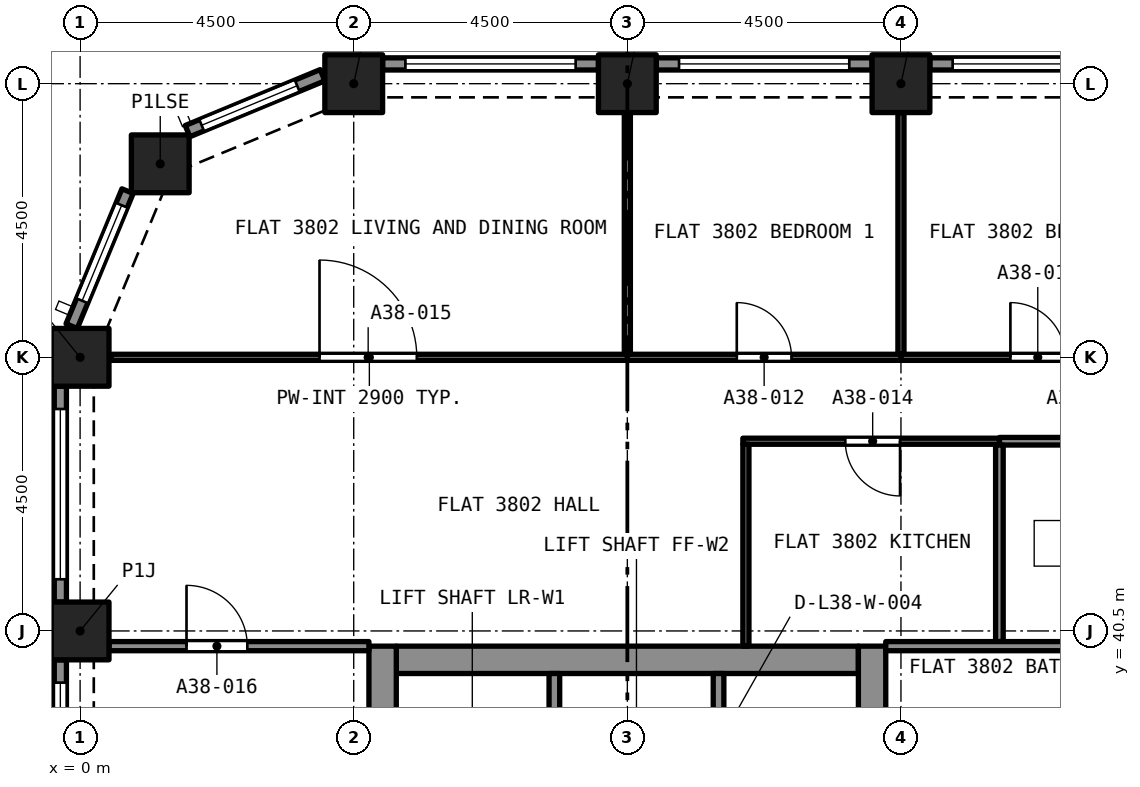
"""IFC4 building model, lengths in metres.
Left out: names, types, materials, properties, quantities, classifications, styles, units other than length and angle.
Written with IfcOpenShell. Run it as: python <this file> out.ifc"""

import sys

from ifc_helpers import new_model, si_unit, direction, frame, frame_2d, origin, origin_2d, place, context, subcontext, project, spatial, rectangle, extrude, element, fill, save


model = new_model("IFC4")
c1 = context("Model", 3, precision=1e-05, world=origin(), true_north=direction((0.0, 1.0)))
c2 = subcontext(c1, "Body", "Model", "MODEL_VIEW")
j1 = project(units=[si_unit("LENGTHUNIT", "METRE"), si_unit("PLANEANGLEUNIT", "RADIAN")], contexts=[c1])
p1 = place(None, origin())
s1 = spatial("IfcSite", under=j1, at=p1, CompositionType="ELEMENT")
p2 = place(p1, origin())
s2 = spatial("IfcBuilding", under=s1, at=p2, CompositionType="ELEMENT")
p3 = place(p2, frame((0.0, 0.0, 136.6)))
s3 = spatial("IfcBuildingStorey", under=s2, at=p3, CompositionType="ELEMENT", Elevation=136.6)
for number, where, z_axis, x_axis in (
    (1, (0.0, 40.5, 0.0), (0.0, 0.0, 1.0), (1.0, 0.0, 0.0)),
    (2, (0.0, 45.0, 0.0), (0.0, 0.0, 1.0), (1.0, 0.0, 0.0)),
    (3, (1.318, 48.182, 0.0), (0.0, 0.0, 1.0), (1.0, 0.0, 0.0)),
    (4, (4.5, 49.5, 0.0), (0.0, 0.0, 1.0), (1.0, 0.0, 0.0)),
    (5, (9.0, 49.5, 0.0), (0.0, 0.0, 1.0), (1.0, 0.0, 0.0)),
    (6, (13.5, 49.5, 0.0), (0.0, 0.0, 1.0), (1.0, 0.0, 0.0)),
):
    element("IfcColumn", number, at=place(p3, frame(where, z_axis=z_axis, x_axis=x_axis)), inside=s3, PredefinedType="COLUMN", context=c2, shape_type="SweptSolid", body=[
        extrude(rectangle(XDim=0.95, YDim=0.95, at=origin_2d()), origin(), (0.0, 0.0, 1.0), 3.2),
    ])
p4 = place(p3, frame((5.2, 40.025, 0.0), z_axis=(0.0, 0.0, 1.0), x_axis=(1.0, 0.0, 0.0)))
e7 = element("IfcWall", 7, at=p4, inside=s3, PredefinedType="SOLIDWALL", context=c2, shape_type="SweptSolid", body=[
    extrude(rectangle(XDim=7.6, YDim=0.45, at=frame_2d((3.8, 0.0))), origin(), (0.0, 0.0, 1.0), 3.2),
])
p5 = place(p3, frame((4.975, 27.25, 0.0), z_axis=(0.0, 0.0, 1.0), x_axis=(0.0, 1.0, 0.0)))
e8 = element("IfcWall", 8, at=p5, inside=s3, PredefinedType="SOLIDWALL", context=c2, shape_type="SweptSolid", body=[
    extrude(rectangle(XDim=13.0, YDim=0.45, at=frame_2d((6.5, 0.0))), origin(), (0.0, 0.0, 1.0), 3.2),
])
p6 = place(p5, frame((8.7, 0.0, 0.0)))
e9 = element("IfcOpeningElement", 9, at=p6, cuts=e8, PredefinedType="OPENING", context=c2, shape_type="SweptSolid", body=[
    extrude(rectangle(XDim=1.2, YDim=2.1, at=frame_2d((0.6, 1.05))), frame((0.0, 0.235, 0.0), z_axis=(0.0, -1.0, 0.0), x_axis=(1.0, 0.0, 0.0)), (0.0, 0.0, 1.0), 0.47),
])
p7 = place(p3, frame((13.025, 27.25, 0.0), z_axis=(0.0, 0.0, 1.0), x_axis=(0.0, 1.0, 0.0)))
e10 = element("IfcWall", 10, at=p7, inside=s3, PredefinedType="SOLIDWALL", context=c2, shape_type="SweptSolid", body=[
    extrude(rectangle(XDim=13.0, YDim=0.45, at=frame_2d((6.5, 0.0))), origin(), (0.0, 0.0, 1.0), 3.2),
])
p8 = place(p7, frame((10.85, 0.0, 0.0)))
e11 = element("IfcOpeningElement", 11, at=p8, cuts=e10, PredefinedType="OPENING", context=c2, shape_type="SweptSolid", body=[
    extrude(rectangle(XDim=1.1, YDim=2.1, at=frame_2d((0.55, 1.05))), frame((0.0, 0.235, 0.0), z_axis=(0.0, -1.0, 0.0), x_axis=(1.0, 0.0, 0.0)), (0.0, 0.0, 1.0), 0.47),
])
p9 = place(p7, frame((8.7, 0.0, 0.0)))
e12 = element("IfcOpeningElement", 12, at=p9, cuts=e10, PredefinedType="OPENING", context=c2, shape_type="SweptSolid", body=[
    extrude(rectangle(XDim=1.2, YDim=2.1, at=frame_2d((0.6, 1.05))), frame((0.0, 0.235, 0.0), z_axis=(0.0, -1.0, 0.0), x_axis=(1.0, 0.0, 0.0)), (0.0, 0.0, 1.0), 0.47),
])
p10 = place(p3, frame((13.975, 49.825, 0.0), z_axis=(0.0, 0.0, 1.0), x_axis=(1.0, 0.0, 0.0)))
e13 = element("IfcWall", 13, at=p10, inside=s3, PredefinedType="SOLIDWALL", context=c2, shape_type="SweptSolid", body=[
    extrude(rectangle(XDim=3.55, YDim=0.2, at=frame_2d((1.775, 0.0))), origin(), (0.0, 0.0, 1.0), 3.2),
])
p11 = place(p10, frame((0.375, 0.0, 0.45)))
e14 = element("IfcOpeningElement", 14, at=p11, cuts=e13, PredefinedType="OPENING", context=c2, shape_type="SweptSolid", body=[
    extrude(rectangle(XDim=2.8, YDim=1.95, at=frame_2d((1.4, 0.975))), frame((0.0, 0.11, 0.0), z_axis=(0.0, -1.0, 0.0), x_axis=(1.0, 0.0, 0.0)), (0.0, 0.0, 1.0), 0.22),
])
p12 = place(p3, frame((9.475, 49.825, 0.0), z_axis=(0.0, 0.0, 1.0), x_axis=(1.0, 0.0, 0.0)))
e15 = element("IfcWall", 15, at=p12, inside=s3, PredefinedType="SOLIDWALL", context=c2, shape_type="SweptSolid", body=[
    extrude(rectangle(XDim=3.55, YDim=0.2, at=frame_2d((1.775, 0.0))), origin(), (0.0, 0.0, 1.0), 3.2),
])
p13 = place(p12, frame((0.375, 0.0, 0.45)))
e16 = element("IfcOpeningElement", 16, at=p13, cuts=e15, PredefinedType="OPENING", context=c2, shape_type="SweptSolid", body=[
    extrude(rectangle(XDim=2.8, YDim=1.95, at=frame_2d((1.4, 0.975))), frame((0.0, 0.11, 0.0), z_axis=(0.0, -1.0, 0.0), x_axis=(1.0, 0.0, 0.0)), (0.0, 0.0, 1.0), 0.22),
])
p14 = place(p3, frame((4.975, 49.825, 0.0), z_axis=(0.0, 0.0, 1.0), x_axis=(1.0, 0.0, 0.0)))
e17 = element("IfcWall", 17, at=p14, inside=s3, PredefinedType="SOLIDWALL", context=c2, shape_type="SweptSolid", body=[
    extrude(rectangle(XDim=3.55, YDim=0.2, at=frame_2d((1.775, 0.0))), origin(), (0.0, 0.0, 1.0), 3.2),
])
p15 = place(p14, frame((0.375, 0.0, 0.45)))
e18 = element("IfcOpeningElement", 18, at=p15, cuts=e17, PredefinedType="OPENING", context=c2, shape_type="SweptSolid", body=[
    extrude(rectangle(XDim=2.8, YDim=1.95, at=frame_2d((1.4, 0.975))), frame((0.0, 0.11, 0.0), z_axis=(0.0, -1.0, 0.0), x_axis=(1.0, 0.0, 0.0)), (0.0, 0.0, 1.0), 0.22),
])
p16 = place(p3, frame((1.767, 48.72, 0.0), z_axis=(0.0, 0.0, 1.0), x_axis=(0.923880599843, 0.382680855588, 0.0)))
e19 = element("IfcWall", 19, at=p16, inside=s3, PredefinedType="SOLIDWALL", context=c2, shape_type="SweptSolid", body=[
    extrude(rectangle(XDim=2.403, YDim=0.2, at=frame_2d((1.201, 0.0))), origin(), (0.0, 0.0, 1.0), 3.2),
])
p17 = place(p16, frame((0.251, 0.0, 0.45)))
e20 = element("IfcOpeningElement", 20, at=p17, cuts=e19, PredefinedType="OPENING", context=c2, shape_type="SweptSolid", body=[
    extrude(rectangle(XDim=1.7, YDim=1.95, at=frame_2d((0.85, 0.975))), frame((0.0, 0.11, 0.0), z_axis=(0.0, -1.0, 0.0), x_axis=(1.0, 0.0, 0.0)), (0.0, 0.0, 1.0), 0.22),
])
p18 = place(p3, frame((-0.139, 45.513, 0.0), z_axis=(0.0, 0.0, 1.0), x_axis=(0.382680855588, 0.923880599843, 0.0)))
e21 = element("IfcWall", 21, at=p18, inside=s3, PredefinedType="SOLIDWALL", context=c2, shape_type="SweptSolid", body=[
    extrude(rectangle(XDim=2.403, YDim=0.2, at=frame_2d((1.201, 0.0))), origin(), (0.0, 0.0, 1.0), 3.2),
])
p19 = place(p18, frame((0.451, 0.0, 0.45)))
e22 = element("IfcOpeningElement", 22, at=p19, cuts=e21, PredefinedType="OPENING", context=c2, shape_type="SweptSolid", body=[
    extrude(rectangle(XDim=1.7, YDim=1.95, at=frame_2d((0.85, 0.975))), frame((0.0, 0.11, 0.0), z_axis=(0.0, -1.0, 0.0), x_axis=(1.0, 0.0, 0.0)), (0.0, 0.0, 1.0), 0.22),
])
p20 = place(p3, frame((-0.325, 40.975, 0.0), z_axis=(0.0, 0.0, 1.0), x_axis=(0.0, 1.0, 0.0)))
e23 = element("IfcWall", 23, at=p20, inside=s3, PredefinedType="SOLIDWALL", context=c2, shape_type="SweptSolid", body=[
    extrude(rectangle(XDim=3.55, YDim=0.2, at=frame_2d((1.775, 0.0))), origin(), (0.0, 0.0, 1.0), 3.2),
])
p21 = place(p20, frame((0.375, 0.0, 0.45)))
e24 = element("IfcOpeningElement", 24, at=p21, cuts=e23, PredefinedType="OPENING", context=c2, shape_type="SweptSolid", body=[
    extrude(rectangle(XDim=2.8, YDim=1.95, at=frame_2d((1.4, 0.975))), frame((0.0, 0.11, 0.0), z_axis=(0.0, -1.0, 0.0), x_axis=(1.0, 0.0, 0.0)), (0.0, 0.0, 1.0), 0.22),
])
p22 = place(p3, frame((-0.325, 36.475, 0.0), z_axis=(0.0, 0.0, 1.0), x_axis=(0.0, 1.0, 0.0)))
e25 = element("IfcWall", 25, at=p22, inside=s3, PredefinedType="SOLIDWALL", context=c2, shape_type="SweptSolid", body=[
    extrude(rectangle(XDim=3.55, YDim=0.2, at=frame_2d((1.775, 0.0))), origin(), (0.0, 0.0, 1.0), 3.2),
])
p23 = place(p22, frame((0.375, 0.0, 0.45)))
e26 = element("IfcOpeningElement", 26, at=p23, cuts=e25, PredefinedType="OPENING", context=c2, shape_type="SweptSolid", body=[
    extrude(rectangle(XDim=2.8, YDim=1.95, at=frame_2d((1.4, 0.975))), frame((0.0, 0.11, 0.0), z_axis=(0.0, -1.0, 0.0), x_axis=(1.0, 0.0, 0.0)), (0.0, 0.0, 1.0), 0.22),
])
p24 = place(p3, frame((17.9, 43.62, 0.0), z_axis=(0.0, 0.0, 1.0), x_axis=(-1.0, 0.0, 0.0)))
e27 = element("IfcWall", 27, at=p24, inside=s3, PredefinedType="PARTITIONING", context=c2, shape_type="SweptSolid", body=[
    extrude(rectangle(XDim=2.781, YDim=0.125, at=frame_2d((1.39, 0.0))), origin(), (0.0, 0.0, 1.0), 2.9),
])
p25 = place(p24, frame((0.94, 0.0, 0.0)))
e28 = element("IfcOpeningElement", 28, at=p25, cuts=e27, PredefinedType="OPENING", context=c2, shape_type="SweptSolid", body=[
    extrude(rectangle(XDim=0.8, YDim=2.1, at=frame_2d((0.4, 1.05))), frame((0.0, 0.073, 0.0), z_axis=(0.0, -1.0, 0.0), x_axis=(1.0, 0.0, 0.0)), (0.0, 0.0, 1.0), 0.145),
])
p26 = place(p3, frame((15.119, 40.325, 0.0), z_axis=(0.0, 0.0, 1.0), x_axis=(0.0, 1.0, 0.0)))
e29 = element("IfcWall", 29, at=p26, inside=s3, PredefinedType="PARTITIONING", context=c2, shape_type="SweptSolid", body=[
    extrude(rectangle(XDim=3.233, YDim=0.125, at=frame_2d((1.616, 0.0))), origin(), (0.0, 0.0, 1.0), 2.9),
])
p27 = place(p3, frame((13.5, 45.05, 0.0), z_axis=(0.0, 0.0, 1.0), x_axis=(0.0, 1.0, 0.0)))
e30 = element("IfcWall", 30, at=p27, inside=s3, PredefinedType="PARTITIONING", context=c2, shape_type="SweptSolid", body=[
    extrude(rectangle(XDim=3.975, YDim=0.1, at=frame_2d((1.987, 0.0))), origin(), (0.0, 0.0, 1.0), 2.9),
])
p28 = place(p3, frame((9.0, 45.0, 0.0), z_axis=(0.0, 0.0, 1.0), x_axis=(1.0, 0.0, 0.0)))
e31 = element("IfcWall", 31, at=p28, inside=s3, PredefinedType="PARTITIONING", context=c2, shape_type="SweptSolid", body=[
    extrude(rectangle(XDim=4.5, YDim=0.1, at=frame_2d((2.25, 0.0))), origin(), (0.0, 0.0, 1.0), 2.9),
])
p29 = place(p28, frame((1.8, 0.0, 0.0)))
e32 = element("IfcOpeningElement", 32, at=p29, cuts=e31, PredefinedType="OPENING", context=c2, shape_type="SweptSolid", body=[
    extrude(rectangle(XDim=0.9, YDim=2.1, at=frame_2d((0.45, 1.05))), frame((0.0, 0.06, 0.0), z_axis=(0.0, -1.0, 0.0), x_axis=(1.0, 0.0, 0.0)), (0.0, 0.0, 1.0), 0.12),
])
p30 = place(p3, frame((9.0, 45.05, 0.0), z_axis=(0.0, 0.0, 1.0), x_axis=(0.0, 1.0, 0.0)))
e33 = element("IfcWall", 33, at=p30, inside=s3, PredefinedType="PARTITIONING", context=c2, shape_type="SweptSolid", body=[
    extrude(rectangle(XDim=3.975, YDim=0.1, at=frame_2d((1.987, 0.0))), origin(), (0.0, 0.0, 1.0), 2.9),
])
p31 = place(p3, frame((13.5, 45.0, 0.0), z_axis=(0.0, 0.0, 1.0), x_axis=(1.0, 0.0, 0.0)))
e34 = element("IfcWall", 34, at=p31, inside=s3, PredefinedType="PARTITIONING", context=c2, shape_type="SweptSolid", body=[
    extrude(rectangle(XDim=4.025, YDim=0.1, at=frame_2d((2.012, 0.0))), origin(), (0.0, 0.0, 1.0), 2.9),
])
p32 = place(p31, frame((1.8, 0.0, 0.0)))
e35 = element("IfcOpeningElement", 35, at=p32, cuts=e34, PredefinedType="OPENING", context=c2, shape_type="SweptSolid", body=[
    extrude(rectangle(XDim=0.9, YDim=2.1, at=frame_2d((0.45, 1.05))), frame((0.0, 0.06, 0.0), z_axis=(0.0, -1.0, 0.0), x_axis=(1.0, 0.0, 0.0)), (0.0, 0.0, 1.0), 0.12),
])
p33 = place(p3, frame((15.119, 43.62, 0.0), z_axis=(0.0, 0.0, 1.0), x_axis=(-1.0, 0.0, 0.0)))
e36 = element("IfcWall", 36, at=p33, inside=s3, PredefinedType="PARTITIONING", context=c2, shape_type="SweptSolid", body=[
    extrude(rectangle(XDim=4.219, YDim=0.1, at=frame_2d((2.11, 0.0))), origin(), (0.0, 0.0, 1.0), 2.9),
])
p34 = place(p33, frame((1.635, 0.0, 0.0)))
e37 = element("IfcOpeningElement", 37, at=p34, cuts=e36, PredefinedType="OPENING", context=c2, shape_type="SweptSolid", body=[
    extrude(rectangle(XDim=0.9, YDim=2.1, at=frame_2d((0.45, 1.05))), frame((0.0, 0.06, 0.0), z_axis=(0.0, -1.0, 0.0), x_axis=(1.0, 0.0, 0.0)), (0.0, 0.0, 1.0), 0.12),
])
p35 = place(p3, frame((10.95, 40.25, 0.0), z_axis=(0.0, 0.0, 1.0), x_axis=(0.0, 1.0, 0.0)))
e38 = element("IfcWall", 38, at=p35, inside=s3, PredefinedType="PARTITIONING", context=c2, shape_type="SweptSolid", body=[
    extrude(rectangle(XDim=3.32, YDim=0.1, at=frame_2d((1.66, 0.0))), origin(), (0.0, 0.0, 1.0), 2.9),
])
p36 = place(p3, frame((0.514, 45.0, 0.0), z_axis=(0.0, 0.0, 1.0), x_axis=(1.0, 0.0, 0.0)))
e39 = element("IfcWall", 39, at=p36, inside=s3, PredefinedType="PARTITIONING", context=c2, shape_type="SweptSolid", body=[
    extrude(rectangle(XDim=8.486, YDim=0.1, at=frame_2d((4.243, 0.0))), origin(), (0.0, 0.0, 1.0), 2.9),
])
p37 = place(p36, frame((3.423, 0.0, 0.0)))
e40 = element("IfcOpeningElement", 40, at=p37, cuts=e39, PredefinedType="OPENING", context=c2, shape_type="SweptSolid", body=[
    extrude(rectangle(XDim=1.6, YDim=2.1, at=frame_2d((0.8, 1.05))), frame((0.0, 0.06, 0.0), z_axis=(0.0, -1.0, 0.0), x_axis=(1.0, 0.0, 0.0)), (0.0, 0.0, 1.0), 0.12),
])
p38 = place(p3, frame((0.475, 40.25, 0.0), z_axis=(0.0, 0.0, 1.0), x_axis=(1.0, 0.0, 0.0)))
e41 = element("IfcWall", 41, at=p38, inside=s3, PredefinedType="PARTITIONING", context=c2, shape_type="SweptSolid", body=[
    extrude(rectangle(XDim=4.275, YDim=0.15, at=frame_2d((2.137, 0.0))), origin(), (0.0, 0.0, 1.0), 2.9),
])
p39 = place(p38, frame((1.275, 0.0, 0.0)))
e42 = element("IfcOpeningElement", 42, at=p39, cuts=e41, PredefinedType="OPENING", context=c2, shape_type="SweptSolid", body=[
    extrude(rectangle(XDim=1.0, YDim=2.1, at=frame_2d((0.5, 1.05))), frame((0.0, 0.085, 0.0), z_axis=(0.0, -1.0, 0.0), x_axis=(1.0, 0.0, 0.0)), (0.0, 0.0, 1.0), 0.17),
])
p40 = place(p3, frame((13.25, 40.25, 0.0), z_axis=(0.0, 0.0, 1.0), x_axis=(1.0, 0.0, 0.0)))
e43 = element("IfcWall", 43, at=p40, inside=s3, PredefinedType="PARTITIONING", context=c2, shape_type="SweptSolid", body=[
    extrude(rectangle(XDim=4.275, YDim=0.15, at=frame_2d((2.137, 0.0))), origin(), (0.0, 0.0, 1.0), 2.9),
])
p41 = place(p3, frame((7.8, 37.5, 0.0), z_axis=(0.0, 0.0, 1.0), x_axis=(0.0, 1.0, 0.0)))
e44 = element("IfcWall", 44, at=p41, inside=s3, PredefinedType="SOLIDWALL", context=c2, shape_type="SweptSolid", body=[
    extrude(rectangle(XDim=2.3, YDim=0.175, at=frame_2d((1.15, 0.0))), origin(), (0.0, 0.0, 1.0), 2.9),
])
p42 = place(p3, frame((10.5, 37.5, 0.0), z_axis=(0.0, 0.0, 1.0), x_axis=(0.0, 1.0, 0.0)))
e45 = element("IfcWall", 45, at=p42, inside=s3, PredefinedType="SOLIDWALL", context=c2, shape_type="SweptSolid", body=[
    extrude(rectangle(XDim=2.3, YDim=0.175, at=frame_2d((1.15, 0.0))), origin(), (0.0, 0.0, 1.0), 2.9),
])
p43 = place(p42, frame((0.65, 0.0, 0.0)))
e46 = element("IfcOpeningElement", 46, at=p43, cuts=e45, PredefinedType="OPENING", context=c2, shape_type="SweptSolid", body=[
    extrude(rectangle(XDim=1.0, YDim=2.1, at=frame_2d((0.5, 1.05))), frame((0.0, 0.097, 0.0), z_axis=(0.0, -1.0, 0.0), x_axis=(1.0, 0.0, 0.0)), (0.0, 0.0, 1.0), 0.195),
])
p44 = place(p11, origin())
e47 = element("IfcWindow", 47, at=p44, inside=s3, PartitioningType="SINGLE_PANEL", PredefinedType="WINDOW", context=c2, shape_type="SweptSolid", body=[
    extrude(rectangle(XDim=2.8, YDim=1.95, at=frame_2d((1.4, 0.975))), frame((0.0, 0.03, 0.0), z_axis=(0.0, -1.0, 0.0), x_axis=(1.0, 0.0, 0.0)), (0.0, 0.0, 1.0), 0.06),
])
fill(e14, e47)
p45 = place(p13, origin())
e48 = element("IfcWindow", 48, at=p45, inside=s3, PartitioningType="SINGLE_PANEL", PredefinedType="WINDOW", context=c2, shape_type="SweptSolid", body=[
    extrude(rectangle(XDim=2.8, YDim=1.95, at=frame_2d((1.4, 0.975))), frame((0.0, 0.03, 0.0), z_axis=(0.0, -1.0, 0.0), x_axis=(1.0, 0.0, 0.0)), (0.0, 0.0, 1.0), 0.06),
])
fill(e16, e48)
p46 = place(p15, origin())
e49 = element("IfcWindow", 49, at=p46, inside=s3, PartitioningType="SINGLE_PANEL", PredefinedType="WINDOW", context=c2, shape_type="SweptSolid", body=[
    extrude(rectangle(XDim=2.8, YDim=1.95, at=frame_2d((1.4, 0.975))), frame((0.0, 0.03, 0.0), z_axis=(0.0, -1.0, 0.0), x_axis=(1.0, 0.0, 0.0)), (0.0, 0.0, 1.0), 0.06),
])
fill(e18, e49)
p47 = place(p17, origin())
e50 = element("IfcWindow", 50, at=p47, inside=s3, PartitioningType="SINGLE_PANEL", PredefinedType="WINDOW", context=c2, shape_type="SweptSolid", body=[
    extrude(rectangle(XDim=1.7, YDim=1.95, at=frame_2d((0.85, 0.975))), frame((0.0, 0.03, 0.0), z_axis=(0.0, -1.0, 0.0), x_axis=(1.0, 0.0, 0.0)), (0.0, 0.0, 1.0), 0.06),
])
fill(e20, e50)
p48 = place(p19, origin())
e51 = element("IfcWindow", 51, at=p48, inside=s3, PartitioningType="SINGLE_PANEL", PredefinedType="WINDOW", context=c2, shape_type="SweptSolid", body=[
    extrude(rectangle(XDim=1.7, YDim=1.95, at=frame_2d((0.85, 0.975))), frame((0.0, 0.03, 0.0), z_axis=(0.0, -1.0, 0.0), x_axis=(1.0, 0.0, 0.0)), (0.0, 0.0, 1.0), 0.06),
])
fill(e22, e51)
p49 = place(p21, origin())
e52 = element("IfcWindow", 52, at=p49, inside=s3, PartitioningType="SINGLE_PANEL", PredefinedType="WINDOW", context=c2, shape_type="SweptSolid", body=[
    extrude(rectangle(XDim=2.8, YDim=1.95, at=frame_2d((1.4, 0.975))), frame((0.0, 0.03, 0.0), z_axis=(0.0, -1.0, 0.0), x_axis=(1.0, 0.0, 0.0)), (0.0, 0.0, 1.0), 0.06),
])
fill(e24, e52)
p50 = place(p23, origin())
e53 = element("IfcWindow", 53, at=p50, inside=s3, PartitioningType="SINGLE_PANEL", PredefinedType="WINDOW", context=c2, shape_type="SweptSolid", body=[
    extrude(rectangle(XDim=2.8, YDim=1.95, at=frame_2d((1.4, 0.975))), frame((0.0, 0.03, 0.0), z_axis=(0.0, -1.0, 0.0), x_axis=(1.0, 0.0, 0.0)), (0.0, 0.0, 1.0), 0.06),
])
fill(e26, e53)
p51 = place(p29, origin())
e54 = element("IfcDoor", 54, at=p51, inside=s3, OperationType="SINGLE_SWING_LEFT", PredefinedType="DOOR", context=c2, shape_type="SweptSolid", body=[
    extrude(rectangle(XDim=0.9, YDim=2.1, at=frame_2d((0.45, 1.05))), frame((0.0, 0.025, 0.0), z_axis=(0.0, -1.0, 0.0), x_axis=(1.0, 0.0, 0.0)), (0.0, 0.0, 1.0), 0.05),
])
fill(e32, e54)
p52 = place(p32, origin())
e55 = element("IfcDoor", 55, at=p52, inside=s3, OperationType="SINGLE_SWING_RIGHT", PredefinedType="DOOR", context=c2, shape_type="SweptSolid", body=[
    extrude(rectangle(XDim=0.9, YDim=2.1, at=frame_2d((0.45, 1.05))), frame((0.0, 0.025, 0.0), z_axis=(0.0, -1.0, 0.0), x_axis=(1.0, 0.0, 0.0)), (0.0, 0.0, 1.0), 0.05),
])
fill(e35, e55)
p53 = place(p34, origin())
e56 = element("IfcDoor", 56, at=p53, inside=s3, OperationType="SINGLE_SWING_LEFT", PredefinedType="DOOR", context=c2, shape_type="SweptSolid", body=[
    extrude(rectangle(XDim=0.9, YDim=2.1, at=frame_2d((0.45, 1.05))), frame((0.0, 0.025, 0.0), z_axis=(0.0, -1.0, 0.0), x_axis=(1.0, 0.0, 0.0)), (0.0, 0.0, 1.0), 0.05),
])
fill(e37, e56)
p54 = place(p37, origin())
e57 = element("IfcDoor", 57, at=p54, inside=s3, OperationType="SINGLE_SWING_LEFT", PredefinedType="DOOR", context=c2, shape_type="SweptSolid", body=[
    extrude(rectangle(XDim=1.6, YDim=2.1, at=frame_2d((0.8, 1.05))), frame((0.0, 0.025, 0.0), z_axis=(0.0, -1.0, 0.0), x_axis=(1.0, 0.0, 0.0)), (0.0, 0.0, 1.0), 0.05),
])
fill(e40, e57)
p55 = place(p39, origin())
e58 = element("IfcDoor", 58, at=p55, inside=s3, OperationType="SINGLE_SWING_LEFT", PredefinedType="DOOR", context=c2, shape_type="SweptSolid", body=[
    extrude(rectangle(XDim=1.0, YDim=2.1, at=frame_2d((0.5, 1.05))), frame((0.0, 0.025, 0.0), z_axis=(0.0, -1.0, 0.0), x_axis=(1.0, 0.0, 0.0)), (0.0, 0.0, 1.0), 0.05),
])
fill(e42, e58)
save(model, sys.argv[1])
